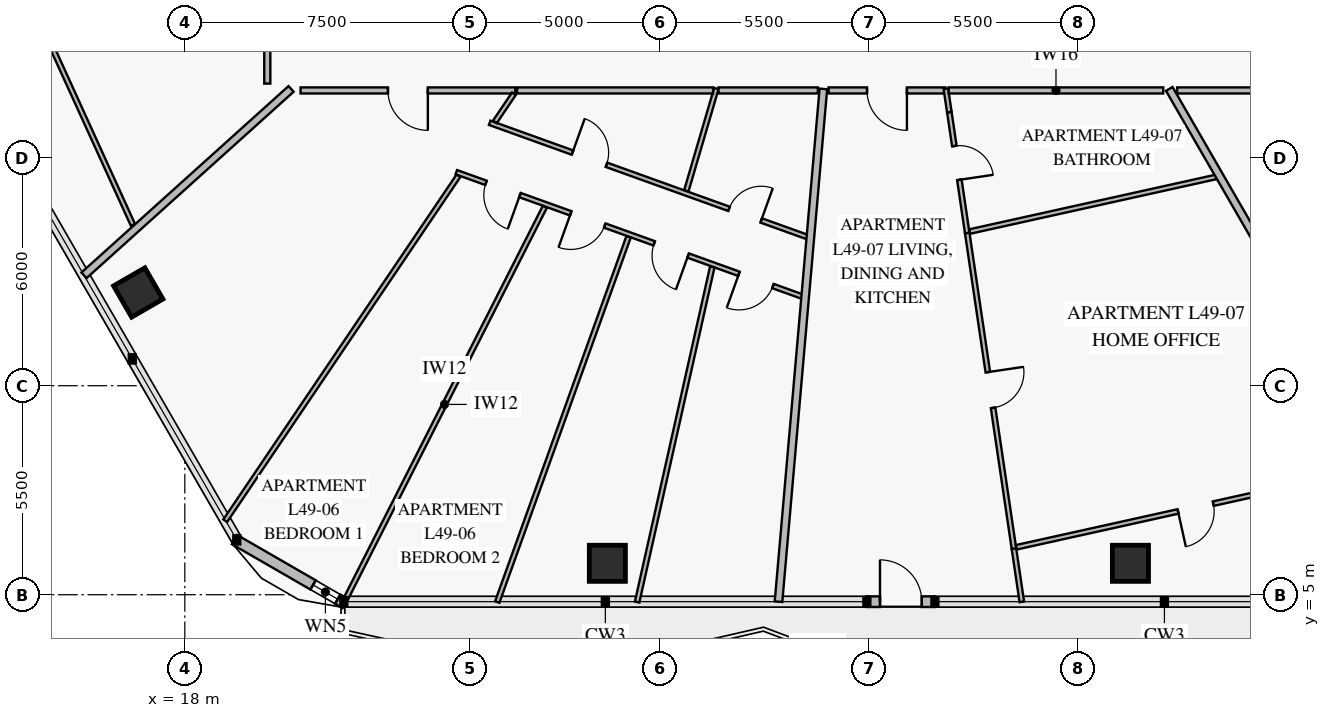
"""IFC4 building model, lengths in metres.
Left out: names, types, materials, properties, quantities, classifications, styles, units other than length and angle.
Written with IfcOpenShell. Run it as: python <this file> out.ifc"""

import sys

from ifc_helpers import new_model, si_unit, direction, frame, frame_2d, origin, origin_2d, place, context, subcontext, project, spatial, rectangle, extrude, element, fill, save


model = new_model("IFC4")
c1 = context("Model", 3, precision=1e-05, world=origin(), true_north=direction((0.0, 1.0)))
c2 = subcontext(c1, "Body", "Model", "MODEL_VIEW")
j1 = project(units=[si_unit("LENGTHUNIT", "METRE"), si_unit("PLANEANGLEUNIT", "RADIAN")], contexts=[c1])
p1 = place(None, origin())
s1 = spatial("IfcSite", under=j1, at=p1, CompositionType="ELEMENT")
p2 = place(p1, origin())
s2 = spatial("IfcBuilding", under=s1, at=p2, CompositionType="ELEMENT")
p3 = place(p2, frame((0.0, 0.0, 196.0)))
s3 = spatial("IfcBuildingStorey", under=s2, at=p3, CompositionType="ELEMENT", Elevation=196.0)
for number, where, z_axis, x_axis in (
    (1, (16.774, 12.953, 0.0), (0.0, 0.0, 1.0), (0.5, -0.866, 0.0)),
    (2, (29.118, 5.827, 0.0), (0.0, 0.0, 1.0), (1.0, 0.0, 0.0)),
    (3, (42.882, 5.827, 0.0), (0.0, 0.0, 1.0), (1.0, 0.0, 0.0)),
):
    element("IfcColumn", number, at=place(p3, frame(where, z_axis=z_axis, x_axis=x_axis)), inside=s3, PredefinedType="COLUMN", context=c2, shape_type="SweptSolid", body=[
        extrude(rectangle(XDim=0.95, YDim=0.95, at=origin_2d()), origin(), (0.0, 0.0, 1.0), 3.55),
    ])
p4 = place(p3, frame((37.737, 4.817, 0.0), z_axis=(0.0, 0.0, 1.0), x_axis=(-1.0, 0.0, 0.0)))
e4 = element("IfcWall", 4, at=p4, inside=s3, PredefinedType="SOLIDWALL", context=c2, shape_type="SweptSolid", body=[
    extrude(rectangle(XDim=1.79, YDim=0.28, at=frame_2d((0.895, 0.0))), origin(), (0.0, 0.0, 1.0), 3.55),
])
p5 = place(p4, frame((0.345, 0.0, 0.0)))
e5 = element("IfcOpeningElement", 5, at=p5, cuts=e4, PredefinedType="OPENING", context=c2, shape_type="SweptSolid", body=[
    extrude(rectangle(XDim=1.1, YDim=2.2, at=frame_2d((0.55, 1.1))), frame((0.0, 0.152, 0.0), z_axis=(0.0, -1.0, 0.0), x_axis=(1.0, 0.0, 0.0)), (0.0, 0.0, 1.0), 0.304),
])
p6 = place(p3, frame((22.221, 4.769, 0.0), z_axis=(0.0, 0.0, 1.0), x_axis=(-0.866020068361, 0.500009241111, 0.0)))
e6 = element("IfcWall", 6, at=p6, inside=s3, PredefinedType="SOLIDWALL", context=c2, shape_type="SweptSolid", body=[
    extrude(rectangle(XDim=3.365, YDim=0.28, at=frame_2d((1.683, 0.0))), origin(), (0.0, 0.0, 1.0), 3.55),
])
p7 = place(p6, frame((0.228, 0.0, 0.85)))
e7 = element("IfcOpeningElement", 7, at=p7, cuts=e6, PredefinedType="OPENING", context=c2, shape_type="SweptSolid", body=[
    extrude(rectangle(XDim=0.75, YDim=1.5, at=frame_2d((0.375, 0.75))), frame((0.0, 0.152, 0.0), z_axis=(0.0, -1.0, 0.0), x_axis=(1.0, 0.0, 0.0)), (0.0, 0.0, 1.0), 0.304),
])
p8 = place(p3, frame((12.744, 23.27, 0.0), z_axis=(0.0, 0.0, 1.0), x_axis=(0.414714516526, -0.909951575515, 0.0)))
e8 = element("IfcWall", 8, at=p8, inside=s3, PredefinedType="PARTITIONING", context=c2, shape_type="SweptSolid", body=[
    extrude(rectangle(XDim=9.381, YDim=0.12, at=frame_2d((4.69, 0.0))), origin(), (0.0, 0.0, 1.0), 3.55),
])
p9 = place(p8, frame((3.251, 0.0, 0.0)))
e9 = element("IfcOpeningElement", 9, at=p9, cuts=e8, PredefinedType="OPENING", context=c2, shape_type="SweptSolid", body=[
    extrude(rectangle(XDim=0.95, YDim=2.1, at=frame_2d((0.475, 1.05))), frame((0.0, 0.072, 0.0), z_axis=(0.0, -1.0, 0.0), x_axis=(1.0, 0.0, 0.0)), (0.0, 0.0, 1.0), 0.144),
])
p10 = place(p3, frame((26.022, 17.419, 0.0), z_axis=(0.0, 0.0, 1.0), x_axis=(0.940993203868, -0.338425457486, 0.0)))
e10 = element("IfcWall", 10, at=p10, inside=s3, PredefinedType="PARTITIONING", context=c2, shape_type="SweptSolid", body=[
    extrude(rectangle(XDim=8.91, YDim=0.12, at=frame_2d((4.455, 0.0))), origin(), (0.0, 0.0, 1.0), 2.9),
])
p11 = place(p10, frame((2.316, 0.0, 0.0)))
e11 = element("IfcOpeningElement", 11, at=p11, cuts=e10, PredefinedType="OPENING", context=c2, shape_type="SweptSolid", body=[
    extrude(rectangle(XDim=0.95, YDim=2.1, at=frame_2d((0.475, 1.05))), frame((0.0, 0.072, 0.0), z_axis=(0.0, -1.0, 0.0), x_axis=(1.0, 0.0, 0.0)), (0.0, 0.0, 1.0), 0.144),
])
p12 = place(p10, frame((6.693, 0.0, 0.0)))
e12 = element("IfcOpeningElement", 12, at=p12, cuts=e10, PredefinedType="OPENING", context=c2, shape_type="SweptSolid", body=[
    extrude(rectangle(XDim=0.9, YDim=2.1, at=frame_2d((0.45, 1.05))), frame((0.0, 0.072, 0.0), z_axis=(0.0, -1.0, 0.0), x_axis=(1.0, 0.0, 0.0)), (0.0, 0.0, 1.0), 0.144),
])
p13 = place(p3, frame((25.143, 16.119, 0.0), z_axis=(0.0, 0.0, 1.0), x_axis=(0.940999845239, -0.33840699056, 0.0)))
e13 = element("IfcWall", 13, at=p13, inside=s3, PredefinedType="PARTITIONING", context=c2, shape_type="SweptSolid", body=[
    extrude(rectangle(XDim=9.684, YDim=0.12, at=frame_2d((4.842, 0.0))), origin(), (0.0, 0.0, 1.0), 2.9),
])
p14 = place(p13, frame((0.83, 0.0, 0.0)))
e14 = element("IfcOpeningElement", 14, at=p14, cuts=e13, PredefinedType="OPENING", context=c2, shape_type="SweptSolid", body=[
    extrude(rectangle(XDim=0.95, YDim=2.1, at=frame_2d((0.475, 1.05))), frame((0.0, 0.072, 0.0), z_axis=(0.0, -1.0, 0.0), x_axis=(1.0, 0.0, 0.0)), (0.0, 0.0, 1.0), 0.144),
])
p15 = place(p13, frame((3.2, 0.0, 0.0)))
e15 = element("IfcOpeningElement", 15, at=p15, cuts=e13, PredefinedType="OPENING", context=c2, shape_type="SweptSolid", body=[
    extrude(rectangle(XDim=0.95, YDim=2.1, at=frame_2d((0.475, 1.05))), frame((0.0, 0.072, 0.0), z_axis=(0.0, -1.0, 0.0), x_axis=(1.0, 0.0, 0.0)), (0.0, 0.0, 1.0), 0.144),
])
p16 = place(p13, frame((5.533, 0.0, 0.0)))
e16 = element("IfcOpeningElement", 16, at=p16, cuts=e13, PredefinedType="OPENING", context=c2, shape_type="SweptSolid", body=[
    extrude(rectangle(XDim=0.95, YDim=2.1, at=frame_2d((0.475, 1.05))), frame((0.0, 0.072, 0.0), z_axis=(0.0, -1.0, 0.0), x_axis=(1.0, 0.0, 0.0)), (0.0, 0.0, 1.0), 0.144),
])
p17 = place(p13, frame((7.904, 0.0, 0.0)))
e17 = element("IfcOpeningElement", 17, at=p17, cuts=e13, PredefinedType="OPENING", context=c2, shape_type="SweptSolid", body=[
    extrude(rectangle(XDim=0.95, YDim=2.1, at=frame_2d((0.475, 1.05))), frame((0.0, 0.072, 0.0), z_axis=(0.0, -1.0, 0.0), x_axis=(1.0, 0.0, 0.0)), (0.0, 0.0, 1.0), 0.144),
])
p18 = place(p3, frame((21.046, 18.27, 0.0), z_axis=(0.0, 0.0, 1.0), x_axis=(1.0, 0.0, 0.0)))
e18 = element("IfcWall", 18, at=p18, inside=s3, PredefinedType="PARTITIONING", context=c2, shape_type="SweptSolid", body=[
    extrude(rectangle(XDim=5.648, YDim=0.16, at=frame_2d((2.824, 0.0))), origin(), (0.0, 0.0, 1.0), 2.9),
])
p19 = place(p18, frame((2.299, 0.0, 0.0)))
e19 = element("IfcOpeningElement", 19, at=p19, cuts=e18, PredefinedType="OPENING", context=c2, shape_type="SweptSolid", body=[
    extrude(rectangle(XDim=1.05, YDim=2.15, at=frame_2d((0.525, 1.075))), frame((0.0, 0.092, 0.0), z_axis=(0.0, -1.0, 0.0), x_axis=(1.0, 0.0, 0.0)), (0.0, 0.0, 1.0), 0.184),
])
p20 = place(p3, frame((38.117, 17.7, 0.0), z_axis=(0.0, 0.0, 1.0), x_axis=(0.146444162785, -0.989218937944, 0.0)))
e20 = element("IfcWall", 20, at=p20, inside=s3, PredefinedType="PARTITIONING", context=c2, shape_type="SweptSolid", body=[
    extrude(rectangle(XDim=3.218, YDim=0.12, at=frame_2d((1.609, 0.0))), origin(), (0.0, 0.0, 1.0), 3.55),
])
p21 = place(p20, frame((0.901, 0.0, 0.0)))
e21 = element("IfcOpeningElement", 21, at=p21, cuts=e20, PredefinedType="OPENING", context=c2, shape_type="SweptSolid", body=[
    extrude(rectangle(XDim=0.9, YDim=2.1, at=frame_2d((0.45, 1.05))), frame((0.0, 0.072, 0.0), z_axis=(0.0, -1.0, 0.0), x_axis=(1.0, 0.0, 0.0)), (0.0, 0.0, 1.0), 0.144),
])
p22 = place(p3, frame((38.588, 14.517, 0.0), z_axis=(0.0, 0.0, 1.0), x_axis=(0.146416974586, -0.989222962508, 0.0)))
e22 = element("IfcWall", 22, at=p22, inside=s3, PredefinedType="PARTITIONING", context=c2, shape_type="SweptSolid", body=[
    extrude(rectangle(XDim=8.399, YDim=0.12, at=frame_2d((4.199, 0.0))), origin(), (0.0, 0.0, 1.0), 3.15),
])
p23 = place(p22, frame((3.699, 0.0, 0.0)))
e23 = element("IfcOpeningElement", 23, at=p23, cuts=e22, PredefinedType="OPENING", context=c2, shape_type="SweptSolid", body=[
    extrude(rectangle(XDim=0.95, YDim=2.1, at=frame_2d((0.475, 1.05))), frame((0.0, 0.072, 0.0), z_axis=(0.0, -1.0, 0.0), x_axis=(1.0, 0.0, 0.0)), (0.0, 0.0, 1.0), 0.144),
])
p24 = place(p3, frame((39.881, 6.248, 0.0), z_axis=(0.0, 0.0, 1.0), x_axis=(0.976292102638, 0.216457225167, 0.0)))
e24 = element("IfcWall", 24, at=p24, inside=s3, PredefinedType="PARTITIONING", context=c2, shape_type="SweptSolid", body=[
    extrude(rectangle(XDim=9.833, YDim=0.12, at=frame_2d((4.917, 0.0))), origin(), (0.0, 0.0, 1.0), 2.87),
])
p25 = place(p24, frame((4.357, 0.0, 0.0)))
e25 = element("IfcOpeningElement", 25, at=p25, cuts=e24, PredefinedType="OPENING", context=c2, shape_type="SweptSolid", body=[
    extrude(rectangle(XDim=0.95, YDim=2.1, at=frame_2d((0.475, 1.05))), frame((0.0, 0.072, 0.0), z_axis=(0.0, -1.0, 0.0), x_axis=(1.0, 0.0, 0.0)), (0.0, 0.0, 1.0), 0.144),
])
p26 = place(p3, frame((34.939, 18.27, 0.0), z_axis=(0.0, 0.0, 1.0), x_axis=(1.0, 0.0, 0.0)))
e26 = element("IfcWall", 26, at=p26, inside=s3, PredefinedType="PARTITIONING", context=c2, shape_type="SweptSolid", body=[
    extrude(rectangle(XDim=3.073, YDim=0.16, at=frame_2d((1.536, 0.0))), origin(), (0.0, 0.0, 1.0), 3.55),
])
p27 = place(p26, frame((1.011, 0.0, 0.0)))
e27 = element("IfcOpeningElement", 27, at=p27, cuts=e26, PredefinedType="OPENING", context=c2, shape_type="SweptSolid", body=[
    extrude(rectangle(XDim=1.05, YDim=2.15, at=frame_2d((0.525, 1.075))), frame((0.0, 0.092, 0.0), z_axis=(0.0, -1.0, 0.0), x_axis=(1.0, 0.0, 0.0)), (0.0, 0.0, 1.0), 0.184),
])
p28 = place(p3, frame((44.111, 18.27, 0.0), z_axis=(0.0, 0.0, 1.0), x_axis=(1.0, 0.0, 0.0)))
e28 = element("IfcWall", 28, at=p28, inside=s3, PredefinedType="PARTITIONING", context=c2, shape_type="SweptSolid", body=[
    extrude(rectangle(XDim=6.248, YDim=0.16, at=frame_2d((3.124, 0.0))), origin(), (0.0, 0.0, 1.0), 2.9),
])
p29 = place(p28, frame((2.599, 0.0, 0.0)))
e29 = element("IfcOpeningElement", 29, at=p29, cuts=e28, PredefinedType="OPENING", context=c2, shape_type="SweptSolid", body=[
    extrude(rectangle(XDim=1.05, YDim=2.15, at=frame_2d((0.525, 1.075))), frame((0.0, 0.092, 0.0), z_axis=(0.0, -1.0, 0.0), x_axis=(1.0, 0.0, 0.0)), (0.0, 0.0, 1.0), 0.184),
])
p30 = place(p3, frame((20.796, 18.31, 0.0), z_axis=(0.0, 0.0, 1.0), x_axis=(-0.743136814575, -0.66913950326, 0.0)))
e30 = element("IfcWall", 30, at=p30, inside=s3, PredefinedType="PARTITIONING", context=c2, shape_type="SweptSolid", body=[
    extrude(rectangle(XDim=7.331, YDim=0.2, at=frame_2d((3.666, 0.0))), origin(), (0.0, 0.0, 1.0), 2.87),
])
p31 = place(p3, frame((31.986, 18.32, 0.0), z_axis=(0.0, 0.0, 1.0), x_axis=(-0.281614682236, -0.959527576857, 0.0)))
e31 = element("IfcWall", 31, at=p31, inside=s3, PredefinedType="PARTITIONING", context=c2, shape_type="SweptSolid", body=[
    extrude(rectangle(XDim=2.804, YDim=0.12, at=frame_2d((1.402, 0.0))), origin(), (0.0, 0.0, 1.0), 3.55),
])
p32 = place(p3, frame((27.474, 15.209, 0.0), z_axis=(0.0, 0.0, 1.0), x_axis=(-0.452763264815, -0.89163076777, 0.0)))
e32 = element("IfcWall", 32, at=p32, inside=s3, PredefinedType="PARTITIONING", context=c2, shape_type="SweptSolid", body=[
    extrude(rectangle(XDim=11.666, YDim=0.12, at=frame_2d((5.833, 0.0))), origin(), (0.0, 0.0, 1.0), 2.87),
])
p33 = place(p3, frame((29.677, 14.417, 0.0), z_axis=(0.0, 0.0, 1.0), x_axis=(-0.33839522172, -0.941004077524, 0.0)))
e33 = element("IfcWall", 33, at=p33, inside=s3, PredefinedType="PARTITIONING", context=c2, shape_type="SweptSolid", body=[
    extrude(rectangle(XDim=10.212, YDim=0.12, at=frame_2d((5.106, 0.0))), origin(), (0.0, 0.0, 1.0), 2.87),
])
p34 = place(p3, frame((31.879, 13.625, 0.0), z_axis=(0.0, 0.0, 1.0), x_axis=(-0.218835198181, -0.975761833665, 0.0)))
e34 = element("IfcWall", 34, at=p34, inside=s3, PredefinedType="PARTITIONING", context=c2, shape_type="SweptSolid", body=[
    extrude(rectangle(XDim=9.037, YDim=0.12, at=frame_2d((4.518, 0.0))), origin(), (0.0, 0.0, 1.0), 2.87),
])
p35 = place(p3, frame((26.659, 18.182, 0.0), z_axis=(0.0, 0.0, 1.0), x_axis=(-0.560237678538, -0.828331904219, 0.0)))
e35 = element("IfcWall", 35, at=p35, inside=s3, PredefinedType="PARTITIONING", context=c2, shape_type="SweptSolid", body=[
    extrude(rectangle(XDim=0.893, YDim=0.12, at=frame_2d((0.447, 0.0))), origin(), (0.0, 0.0, 1.0), 3.55),
])
p36 = place(p3, frame((25.201, 16.026, 0.0), z_axis=(0.0, 0.0, 1.0), x_axis=(-0.560066581078, -0.828447599284, 0.0)))
e36 = element("IfcWall", 36, at=p36, inside=s3, PredefinedType="PARTITIONING", context=c2, shape_type="SweptSolid", body=[
    extrude(rectangle(XDim=10.958, YDim=0.12, at=frame_2d((5.479, 0.0))), origin(), (0.0, 0.0, 1.0), 2.87),
])
p37 = place(p3, frame((34.802, 18.31, 0.0), z_axis=(0.0, 0.0, 1.0), x_axis=(-0.087149956805, -0.996195204279, 0.0)))
e37 = element("IfcWall", 37, at=p37, inside=s3, PredefinedType="PARTITIONING", context=c2, shape_type="SweptSolid", body=[
    extrude(rectangle(XDim=13.545, YDim=0.2, at=frame_2d((6.772, 0.0))), origin(), (0.0, 0.0, 1.0), 2.87),
])
p38 = place(p3, frame((38.026, 18.315, 0.0), z_axis=(0.0, 0.0, 1.0), x_axis=(0.146534423424, -0.989205571533, 0.0)))
e38 = element("IfcWall", 38, at=p38, inside=s3, PredefinedType="PARTITIONING", context=c2, shape_type="SweptSolid", body=[
    extrude(rectangle(XDim=0.621, YDim=0.12, at=frame_2d((0.311, 0.0))), origin(), (0.0, 0.0, 1.0), 3.55),
])
p39 = place(p3, frame((39.818, 6.209, 0.0), z_axis=(0.0, 0.0, 1.0), x_axis=(0.146454662443, -0.989217383515, 0.0)))
e39 = element("IfcWall", 39, at=p39, inside=s3, PredefinedType="PARTITIONING", context=c2, shape_type="SweptSolid", body=[
    extrude(rectangle(XDim=1.412, YDim=0.12, at=frame_2d((0.706, 0.0))), origin(), (0.0, 0.0, 1.0), 2.87),
])
p40 = place(p3, frame((38.651, 14.557, 0.0), z_axis=(0.0, 0.0, 1.0), x_axis=(0.976292815714, 0.21645400894, 0.0)))
e40 = element("IfcWall", 40, at=p40, inside=s3, PredefinedType="PARTITIONING", context=c2, shape_type="SweptSolid", body=[
    extrude(rectangle(XDim=6.674, YDim=0.12, at=frame_2d((3.337, 0.0))), origin(), (0.0, 0.0, 1.0), 2.9),
])
p41 = place(p3, frame((43.904, 18.31, 0.0), z_axis=(0.0, 0.0, 1.0), x_axis=(0.500007038605, -0.866021340006, 0.0)))
e41 = element("IfcWall", 41, at=p41, inside=s3, PredefinedType="PARTITIONING", context=c2, shape_type="SweptSolid", body=[
    extrude(rectangle(XDim=15.05, YDim=0.2, at=frame_2d((7.525, 0.0))), origin(), (0.0, 0.0, 1.0), 2.87),
])
p42 = place(p3, frame((20.17, 21.976, 0.0), z_axis=(0.0, 0.0, 1.0), x_axis=(0.0, -1.0, 0.0)))
e42 = element("IfcWall", 42, at=p42, inside=s3, PredefinedType="PARTITIONING", context=c2, shape_type="SweptSolid", body=[
    extrude(rectangle(XDim=3.526, YDim=0.16, at=frame_2d((1.763, 0.0))), origin(), (0.0, 0.0, 1.0), 3.15),
])
p43 = place(p3, frame((26.742, 18.27, 0.0), z_axis=(0.0, 0.0, 1.0), x_axis=(1.0, 0.0, 0.0)))
e43 = element("IfcWall", 43, at=p43, inside=s3, PredefinedType="PARTITIONING", context=c2, shape_type="SweptSolid", body=[
    extrude(rectangle(XDim=5.158, YDim=0.16, at=frame_2d((2.579, 0.0))), origin(), (0.0, 0.0, 1.0), 3.55),
])
p44 = place(p3, frame((32.042, 18.27, 0.0), z_axis=(0.0, 0.0, 1.0), x_axis=(1.0, 0.0, 0.0)))
e44 = element("IfcWall", 44, at=p44, inside=s3, PredefinedType="PARTITIONING", context=c2, shape_type="SweptSolid", body=[
    extrude(rectangle(XDim=2.616, YDim=0.16, at=frame_2d((1.308, 0.0))), origin(), (0.0, 0.0, 1.0), 2.9),
])
p45 = place(p3, frame((38.101, 18.27, 0.0), z_axis=(0.0, 0.0, 1.0), x_axis=(1.0, 0.0, 0.0)))
e45 = element("IfcWall", 45, at=p45, inside=s3, PredefinedType="PARTITIONING", context=c2, shape_type="SweptSolid", body=[
    extrude(rectangle(XDim=5.644, YDim=0.16, at=frame_2d((2.822, 0.0))), origin(), (0.0, 0.0, 1.0), 2.9),
])
p46 = place(p5, frame((1.1, 0.0, 0.0), z_axis=(0.0, 0.0, 1.0), x_axis=(-1.0, 0.0, 0.0)))
e46 = element("IfcDoor", 46, at=p46, inside=s3, OperationType="SINGLE_SWING_LEFT", PredefinedType="DOOR", context=c2, shape_type="SweptSolid", body=[
    extrude(rectangle(XDim=1.1, YDim=2.2, at=frame_2d((0.55, 1.1))), frame((0.0, 0.025, 0.0), z_axis=(0.0, -1.0, 0.0), x_axis=(1.0, 0.0, 0.0)), (0.0, 0.0, 1.0), 0.05),
])
fill(e5, e46)
p47 = place(p7, origin())
e47 = element("IfcWindow", 47, at=p47, inside=s3, PartitioningType="SINGLE_PANEL", PredefinedType="WINDOW", context=c2, shape_type="SweptSolid", body=[
    extrude(rectangle(XDim=0.75, YDim=1.5, at=frame_2d((0.375, 0.75))), frame((0.0, 0.03, 0.0), z_axis=(0.0, -1.0, 0.0), x_axis=(1.0, 0.0, 0.0)), (0.0, 0.0, 1.0), 0.06),
])
fill(e7, e47)
p48 = place(p11, origin())
e48 = element("IfcDoor", 48, at=p48, inside=s3, OperationType="SINGLE_SWING_LEFT", PredefinedType="DOOR", context=c2, shape_type="SweptSolid", body=[
    extrude(rectangle(XDim=0.95, YDim=2.1, at=frame_2d((0.475, 1.05))), frame((0.0, 0.025, 0.0), z_axis=(0.0, -1.0, 0.0), x_axis=(1.0, 0.0, 0.0)), (0.0, 0.0, 1.0), 0.05),
])
fill(e11, e48)
p49 = place(p12, origin())
e49 = element("IfcDoor", 49, at=p49, inside=s3, OperationType="SINGLE_SWING_RIGHT", PredefinedType="DOOR", context=c2, shape_type="SweptSolid", body=[
    extrude(rectangle(XDim=0.9, YDim=2.1, at=frame_2d((0.45, 1.05))), frame((0.0, 0.025, 0.0), z_axis=(0.0, -1.0, 0.0), x_axis=(1.0, 0.0, 0.0)), (0.0, 0.0, 1.0), 0.05),
])
fill(e12, e49)
p50 = place(p14, frame((0.95, 0.0, 0.0), z_axis=(0.0, 0.0, 1.0), x_axis=(-1.0, 0.0, 0.0)))
e50 = element("IfcDoor", 50, at=p50, inside=s3, OperationType="SINGLE_SWING_LEFT", PredefinedType="DOOR", context=c2, shape_type="SweptSolid", body=[
    extrude(rectangle(XDim=0.95, YDim=2.1, at=frame_2d((0.475, 1.05))), frame((0.0, 0.025, 0.0), z_axis=(0.0, -1.0, 0.0), x_axis=(1.0, 0.0, 0.0)), (0.0, 0.0, 1.0), 0.05),
])
fill(e14, e50)
p51 = place(p15, frame((0.95, 0.0, 0.0), z_axis=(0.0, 0.0, 1.0), x_axis=(-1.0, 0.0, 0.0)))
e51 = element("IfcDoor", 51, at=p51, inside=s3, OperationType="SINGLE_SWING_RIGHT", PredefinedType="DOOR", context=c2, shape_type="SweptSolid", body=[
    extrude(rectangle(XDim=0.95, YDim=2.1, at=frame_2d((0.475, 1.05))), frame((0.0, 0.025, 0.0), z_axis=(0.0, -1.0, 0.0), x_axis=(1.0, 0.0, 0.0)), (0.0, 0.0, 1.0), 0.05),
])
fill(e15, e51)
p52 = place(p16, frame((0.95, 0.0, 0.0), z_axis=(0.0, 0.0, 1.0), x_axis=(-1.0, 0.0, 0.0)))
e52 = element("IfcDoor", 52, at=p52, inside=s3, OperationType="SINGLE_SWING_LEFT", PredefinedType="DOOR", context=c2, shape_type="SweptSolid", body=[
    extrude(rectangle(XDim=0.95, YDim=2.1, at=frame_2d((0.475, 1.05))), frame((0.0, 0.025, 0.0), z_axis=(0.0, -1.0, 0.0), x_axis=(1.0, 0.0, 0.0)), (0.0, 0.0, 1.0), 0.05),
])
fill(e16, e52)
p53 = place(p17, frame((0.95, 0.0, 0.0), z_axis=(0.0, 0.0, 1.0), x_axis=(-1.0, 0.0, 0.0)))
e53 = element("IfcDoor", 53, at=p53, inside=s3, OperationType="SINGLE_SWING_RIGHT", PredefinedType="DOOR", context=c2, shape_type="SweptSolid", body=[
    extrude(rectangle(XDim=0.95, YDim=2.1, at=frame_2d((0.475, 1.05))), frame((0.0, 0.025, 0.0), z_axis=(0.0, -1.0, 0.0), x_axis=(1.0, 0.0, 0.0)), (0.0, 0.0, 1.0), 0.05),
])
fill(e17, e53)
p54 = place(p19, frame((1.05, 0.0, 0.0), z_axis=(0.0, 0.0, 1.0), x_axis=(-1.0, 0.0, 0.0)))
e54 = element("IfcDoor", 54, at=p54, inside=s3, OperationType="SINGLE_SWING_LEFT", PredefinedType="DOOR", context=c2, shape_type="SweptSolid", body=[
    extrude(rectangle(XDim=1.05, YDim=2.15, at=frame_2d((0.525, 1.075))), frame((0.0, 0.025, 0.0), z_axis=(0.0, -1.0, 0.0), x_axis=(1.0, 0.0, 0.0)), (0.0, 0.0, 1.0), 0.05),
])
fill(e19, e54)
p55 = place(p21, origin())
e55 = element("IfcDoor", 55, at=p55, inside=s3, OperationType="SINGLE_SWING_RIGHT", PredefinedType="DOOR", context=c2, shape_type="SweptSolid", body=[
    extrude(rectangle(XDim=0.9, YDim=2.1, at=frame_2d((0.45, 1.05))), frame((0.0, 0.025, 0.0), z_axis=(0.0, -1.0, 0.0), x_axis=(1.0, 0.0, 0.0)), (0.0, 0.0, 1.0), 0.05),
])
fill(e21, e55)
p56 = place(p23, origin())
e56 = element("IfcDoor", 56, at=p56, inside=s3, OperationType="SINGLE_SWING_LEFT", PredefinedType="DOOR", context=c2, shape_type="SweptSolid", body=[
    extrude(rectangle(XDim=0.95, YDim=2.1, at=frame_2d((0.475, 1.05))), frame((0.0, 0.025, 0.0), z_axis=(0.0, -1.0, 0.0), x_axis=(1.0, 0.0, 0.0)), (0.0, 0.0, 1.0), 0.05),
])
fill(e23, e56)
p57 = place(p25, frame((0.95, 0.0, 0.0), z_axis=(0.0, 0.0, 1.0), x_axis=(-1.0, 0.0, 0.0)))
e57 = element("IfcDoor", 57, at=p57, inside=s3, OperationType="SINGLE_SWING_RIGHT", PredefinedType="DOOR", context=c2, shape_type="SweptSolid", body=[
    extrude(rectangle(XDim=0.95, YDim=2.1, at=frame_2d((0.475, 1.05))), frame((0.0, 0.025, 0.0), z_axis=(0.0, -1.0, 0.0), x_axis=(1.0, 0.0, 0.0)), (0.0, 0.0, 1.0), 0.05),
])
fill(e25, e57)
p58 = place(p27, frame((1.05, 0.0, 0.0), z_axis=(0.0, 0.0, 1.0), x_axis=(-1.0, 0.0, 0.0)))
e58 = element("IfcDoor", 58, at=p58, inside=s3, OperationType="SINGLE_SWING_LEFT", PredefinedType="DOOR", context=c2, shape_type="SweptSolid", body=[
    extrude(rectangle(XDim=1.05, YDim=2.15, at=frame_2d((0.525, 1.075))), frame((0.0, 0.025, 0.0), z_axis=(0.0, -1.0, 0.0), x_axis=(1.0, 0.0, 0.0)), (0.0, 0.0, 1.0), 0.05),
])
fill(e27, e58)
save(model, sys.argv[1])
